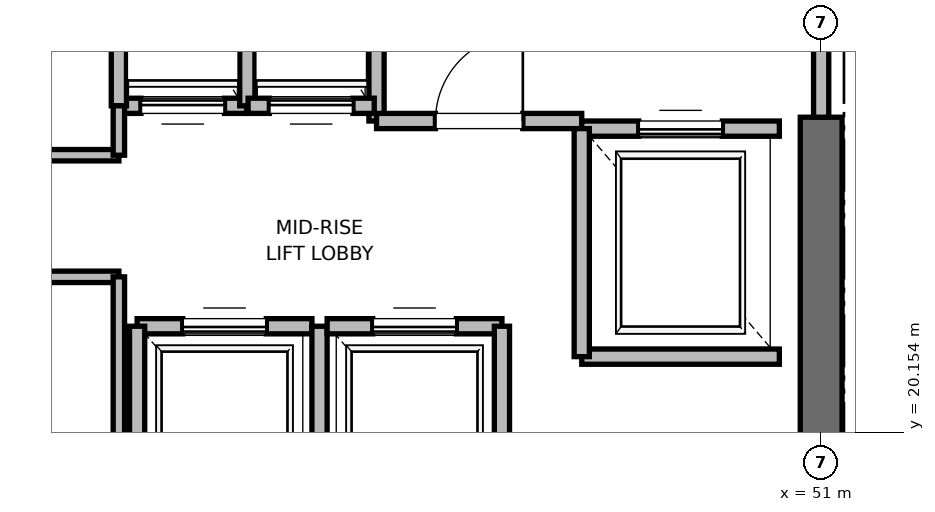
"""IFC4 building model, lengths in metres.
Left out: names, types, materials, properties, quantities, classifications, styles, units other than length and angle.
Written with IfcOpenShell. Run it as: python <this file> out.ifc"""

import sys

from ifc_helpers import new_model, si_unit, direction, frame, frame_2d, origin, place, context, subcontext, project, spatial, rectangle, extrude, element, fill, save


model = new_model("IFC4")
c1 = context("Model", 3, precision=1e-05, world=origin(), true_north=direction((0.0, 1.0)))
c2 = subcontext(c1, "Body", "Model", "MODEL_VIEW")
j1 = project(units=[si_unit("LENGTHUNIT", "METRE"), si_unit("PLANEANGLEUNIT", "RADIAN")], contexts=[c1])
p1 = place(None, origin())
s1 = spatial("IfcSite", under=j1, at=p1, CompositionType="ELEMENT")
p2 = place(p1, origin())
s2 = spatial("IfcBuilding", under=s1, at=p2, CompositionType="ELEMENT")
p3 = place(p2, frame((0.0, 0.0, 180.4)))
s3 = spatial("IfcBuildingStorey", under=s2, at=p3, CompositionType="ELEMENT", Elevation=180.4)
p4 = place(p3, frame((51.0, 18.5, 0.0), z_axis=(0.0, 0.0, 1.0), x_axis=(0.0, 1.0, 0.0)))
e1 = element("IfcWall", 1, at=p4, inside=s3, PredefinedType="SHEAR", context=c2, shape_type="SweptSolid", body=[
    extrude(rectangle(XDim=5.8, YDim=0.55, at=frame_2d((2.9, 0.0))), origin(), (0.0, 0.0, 1.0), 3.7),
])
p5 = place(p3, frame((45.15, 24.25, 0.0), z_axis=(0.0, 0.0, 1.0), x_axis=(0.0, 1.0, 0.0)))
e2 = element("IfcWall", 2, at=p5, inside=s3, PredefinedType="PARTITIONING", context=c2, shape_type="SweptSolid", body=[
    extrude(rectangle(XDim=3.37, YDim=0.2, at=frame_2d((1.685, 0.0))), origin(), (0.0, 0.0, 1.0), 3.7),
])
p6 = place(p3, frame((45.15, 24.25, 0.0), z_axis=(0.0, 0.0, 1.0), x_axis=(1.0, 0.0, 0.0)))
e3 = element("IfcWall", 3, at=p6, inside=s3, PredefinedType="PARTITIONING", context=c2, shape_type="SweptSolid", body=[
    extrude(rectangle(XDim=2.7, YDim=0.2, at=frame_2d((1.35, 0.0))), origin(), (0.0, 0.0, 1.0), 3.7),
])
p7 = place(p6, frame((0.775, 0.0, 0.0)))
e4 = element("IfcOpeningElement", 4, at=p7, cuts=e3, PredefinedType="OPENING", context=c2, shape_type="SweptSolid", body=[
    extrude(rectangle(XDim=1.15, YDim=2.2, at=frame_2d((0.575, 1.1))), frame((0.0, 0.1, 0.0), z_axis=(0.0, -1.0, 0.0), x_axis=(1.0, 0.0, 0.0)), (0.0, 0.0, 1.0), 0.2),
])
p8 = place(p3, frame((51.0, 24.3, 0.0), z_axis=(0.0, 0.0, 1.0), x_axis=(0.0, 1.0, 0.0)))
e5 = element("IfcWall", 5, at=p8, inside=s3, PredefinedType="PARTITIONING", context=c2, shape_type="SweptSolid", body=[
    extrude(rectangle(XDim=3.4, YDim=0.2, at=frame_2d((1.7, 0.0))), origin(), (0.0, 0.0, 1.0), 2.68),
])
p9 = place(p8, frame((1.125, 0.0, 0.0)))
e6 = element("IfcOpeningElement", 6, at=p9, cuts=e5, PredefinedType="OPENING", context=c2, shape_type="SweptSolid", body=[
    extrude(rectangle(XDim=1.15, YDim=2.2, at=frame_2d((0.575, 1.1))), frame((0.0, 0.1, 0.0), z_axis=(0.0, -1.0, 0.0), x_axis=(1.0, 0.0, 0.0)), (0.0, 0.0, 1.0), 0.2),
])
p10 = place(p3, frame((47.85, 21.15, 0.0), z_axis=(0.0, 0.0, 1.0), x_axis=(1.0, 0.0, 0.0)))
e7 = element("IfcWall", 7, at=p10, inside=s3, PredefinedType="SOLIDWALL", context=c2, shape_type="SweptSolid", body=[
    extrude(rectangle(XDim=2.6, YDim=0.2, at=frame_2d((1.3, 0.0))), origin(), (0.0, 0.0, 1.0), 3.7),
])
p11 = place(p3, frame((50.45, 24.15, 0.0), z_axis=(0.0, 0.0, 1.0), x_axis=(-1.0, 0.0, 0.0)))
e8 = element("IfcWall", 8, at=p11, inside=s3, PredefinedType="SOLIDWALL", context=c2, shape_type="SweptSolid", body=[
    extrude(rectangle(XDim=2.6, YDim=0.2, at=frame_2d((1.3, 0.0))), origin(), (0.0, 0.0, 1.0), 2.68),
])
p12 = place(p11, frame((0.75, 0.0, 0.0)))
e9 = element("IfcOpeningElement", 9, at=p12, cuts=e8, PredefinedType="OPENING", context=c2, shape_type="SweptSolid", body=[
    extrude(rectangle(XDim=1.1, YDim=2.2, at=frame_2d((0.55, 1.1))), frame((0.0, 0.1, 0.0), z_axis=(0.0, -1.0, 0.0), x_axis=(1.0, 0.0, 0.0)), (0.0, 0.0, 1.0), 0.2),
])
p13 = place(p3, frame((47.85, 24.15, 0.0), z_axis=(0.0, 0.0, 1.0), x_axis=(0.0, -1.0, 0.0)))
e10 = element("IfcWall", 10, at=p13, inside=s3, PredefinedType="SOLIDWALL", context=c2, shape_type="SweptSolid", body=[
    extrude(rectangle(XDim=3.0, YDim=0.2, at=frame_2d((1.5, 0.0))), origin(), (0.0, 0.0, 1.0), 3.7),
])
p14 = place(p3, frame((44.3, 21.55, 0.0), z_axis=(0.0, 0.0, 1.0), x_axis=(-1.0, 0.0, 0.0)))
e11 = element("IfcWall", 11, at=p14, inside=s3, PredefinedType="SOLIDWALL", context=c2, shape_type="SweptSolid", body=[
    extrude(rectangle(XDim=2.3, YDim=0.2, at=frame_2d((1.15, 0.0))), origin(), (0.0, 0.0, 1.0), 3.7),
])
p15 = place(p14, frame((0.6, 0.0, 0.0)))
e12 = element("IfcOpeningElement", 12, at=p15, cuts=e11, PredefinedType="OPENING", context=c2, shape_type="SweptSolid", body=[
    extrude(rectangle(XDim=1.1, YDim=2.2, at=frame_2d((0.55, 1.1))), frame((0.0, 0.1, 0.0), z_axis=(0.0, -1.0, 0.0), x_axis=(1.0, 0.0, 0.0)), (0.0, 0.0, 1.0), 0.2),
])
p16 = place(p3, frame((42.0, 21.55, 0.0), z_axis=(0.0, 0.0, 1.0), x_axis=(0.0, -1.0, 0.0)))
e13 = element("IfcWall", 13, at=p16, inside=s3, PredefinedType="SOLIDWALL", context=c2, shape_type="SweptSolid", body=[
    extrude(rectangle(XDim=2.6, YDim=0.2, at=frame_2d((1.3, 0.0))), origin(), (0.0, 0.0, 1.0), 2.68),
])
p17 = place(p3, frame((44.4, 18.95, 0.0), z_axis=(0.0, 0.0, 1.0), x_axis=(0.0, 1.0, 0.0)))
e14 = element("IfcWall", 14, at=p17, inside=s3, PredefinedType="SOLIDWALL", context=c2, shape_type="SweptSolid", body=[
    extrude(rectangle(XDim=2.6, YDim=0.2, at=frame_2d((1.3, 0.0))), origin(), (0.0, 0.0, 1.0), 3.7),
])
p18 = place(p3, frame((46.8, 21.55, 0.0), z_axis=(0.0, 0.0, 1.0), x_axis=(-1.0, 0.0, 0.0)))
e15 = element("IfcWall", 15, at=p18, inside=s3, PredefinedType="SOLIDWALL", context=c2, shape_type="SweptSolid", body=[
    extrude(rectangle(XDim=2.3, YDim=0.2, at=frame_2d((1.15, 0.0))), origin(), (0.0, 0.0, 1.0), 3.7),
])
p19 = place(p18, frame((0.6, 0.0, 0.0)))
e16 = element("IfcOpeningElement", 16, at=p19, cuts=e15, PredefinedType="OPENING", context=c2, shape_type="SweptSolid", body=[
    extrude(rectangle(XDim=1.1, YDim=2.2, at=frame_2d((0.55, 1.1))), frame((0.0, 0.1, 0.0), z_axis=(0.0, -1.0, 0.0), x_axis=(1.0, 0.0, 0.0)), (0.0, 0.0, 1.0), 0.2),
])
p20 = place(p3, frame((46.8, 18.95, 0.0), z_axis=(0.0, 0.0, 1.0), x_axis=(0.0, 1.0, 0.0)))
e17 = element("IfcWall", 17, at=p20, inside=s3, PredefinedType="SOLIDWALL", context=c2, shape_type="SweptSolid", body=[
    extrude(rectangle(XDim=2.6, YDim=0.2, at=frame_2d((1.3, 0.0))), origin(), (0.0, 0.0, 1.0), 3.7),
])
p21 = place(p3, frame((41.76, 24.45, 0.0), z_axis=(0.0, 0.0, 1.0), x_axis=(1.0, 0.0, 0.0)))
e18 = element("IfcWall", 18, at=p21, inside=s3, PredefinedType="SOLIDWALL", context=c2, shape_type="SweptSolid", body=[
    extrude(rectangle(XDim=1.68, YDim=0.2, at=frame_2d((0.84, 0.0))), origin(), (0.0, 0.0, 1.0), 3.7),
])
p22 = place(p21, frame((0.29, 0.0, 0.0)))
e19 = element("IfcOpeningElement", 19, at=p22, cuts=e18, PredefinedType="OPENING", context=c2, shape_type="SweptSolid", body=[
    extrude(rectangle(XDim=1.1, YDim=2.2, at=frame_2d((0.55, 1.1))), frame((0.0, 0.1, 0.0), z_axis=(0.0, -1.0, 0.0), x_axis=(1.0, 0.0, 0.0)), (0.0, 0.0, 1.0), 0.2),
])
for number, where, z_axis, x_axis in (
    (20, (41.76, 27.05, 0.0), (0.0, 0.0, 1.0), (0.0, -1.0, 0.0)),
    (21, (43.45, 24.45, 0.0), (0.0, 0.0, 1.0), (0.0, 1.0, 0.0)),
):
    element("IfcWall", number, at=place(p3, frame(where, z_axis=z_axis, x_axis=x_axis)), inside=s3, PredefinedType="SOLIDWALL", context=c2, shape_type="SweptSolid", body=[
        extrude(rectangle(XDim=2.6, YDim=0.2, at=frame_2d((1.3, 0.0))), origin(), (0.0, 0.0, 1.0), 3.7),
    ])
p23 = place(p3, frame((43.46, 24.45, 0.0), z_axis=(0.0, 0.0, 1.0), x_axis=(1.0, 0.0, 0.0)))
e22 = element("IfcWall", 22, at=p23, inside=s3, PredefinedType="SOLIDWALL", context=c2, shape_type="SweptSolid", body=[
    extrude(rectangle(XDim=1.66, YDim=0.2, at=frame_2d((0.83, 0.0))), origin(), (0.0, 0.0, 1.0), 3.7),
])
p24 = place(p23, frame((0.28, 0.0, 0.0)))
e23 = element("IfcOpeningElement", 23, at=p24, cuts=e22, PredefinedType="OPENING", context=c2, shape_type="SweptSolid", body=[
    extrude(rectangle(XDim=1.1, YDim=2.2, at=frame_2d((0.55, 1.1))), frame((0.0, 0.1, 0.0), z_axis=(0.0, -1.0, 0.0), x_axis=(1.0, 0.0, 0.0)), (0.0, 0.0, 1.0), 0.2),
])
for number, where, z_axis, x_axis in (
    (24, (39.95, 22.2, 0.0), (0.0, 0.0, 1.0), (1.0, 0.0, 0.0)),
    (25, (39.95, 23.8, 0.0), (0.0, 0.0, 1.0), (1.0, 0.0, 0.0)),
):
    element("IfcWall", number, at=place(p3, frame(where, z_axis=z_axis, x_axis=x_axis)), inside=s3, PredefinedType="PARTITIONING", context=c2, shape_type="SweptSolid", body=[
        extrude(rectangle(XDim=1.81, YDim=0.15, at=frame_2d((0.905, 0.0))), origin(), (0.0, 0.0, 1.0), 2.85),
    ])
p25 = place(p3, frame((41.76, 18.6, 0.0), z_axis=(0.0, 0.0, 1.0), x_axis=(0.0, 1.0, 0.0)))
e26 = element("IfcWall", 26, at=p25, inside=s3, PredefinedType="PARTITIONING", context=c2, shape_type="SweptSolid", body=[
    extrude(rectangle(XDim=3.6, YDim=0.15, at=frame_2d((1.8, 0.0))), origin(), (0.0, 0.0, 1.0), 2.68),
])
p26 = place(p3, frame((41.76, 23.8, 0.0), z_axis=(0.0, 0.0, 1.0), x_axis=(0.0, 1.0, 0.0)))
e27 = element("IfcWall", 27, at=p26, inside=s3, PredefinedType="PARTITIONING", context=c2, shape_type="SweptSolid", body=[
    extrude(rectangle(XDim=0.65, YDim=0.15, at=frame_2d((0.325, 0.0))), origin(), (0.0, 0.0, 1.0), 2.85),
])
p27 = place(p7, origin())
e28 = element("IfcDoor", 28, at=p27, inside=s3, OperationType="SINGLE_SWING_RIGHT", PredefinedType="DOOR", context=c2, shape_type="SweptSolid", body=[
    extrude(rectangle(XDim=1.15, YDim=2.2, at=frame_2d((0.575, 1.1))), frame((0.0, 0.025, 0.0), z_axis=(0.0, -1.0, 0.0), x_axis=(1.0, 0.0, 0.0)), (0.0, 0.0, 1.0), 0.05),
])
fill(e4, e28)
p28 = place(p12, origin())
e29 = element("IfcDoor", 29, at=p28, inside=s3, OperationType="SLIDING_TO_RIGHT", PredefinedType="DOOR", context=c2, shape_type="SweptSolid", body=[
    extrude(rectangle(XDim=1.1, YDim=2.2, at=frame_2d((0.55, 1.1))), frame((0.0, 0.025, 0.0), z_axis=(0.0, -1.0, 0.0), x_axis=(1.0, 0.0, 0.0)), (0.0, 0.0, 1.0), 0.05),
])
fill(e9, e29)
p29 = place(p15, origin())
e30 = element("IfcDoor", 30, at=p29, inside=s3, OperationType="SLIDING_TO_RIGHT", PredefinedType="DOOR", context=c2, shape_type="SweptSolid", body=[
    extrude(rectangle(XDim=1.1, YDim=2.2, at=frame_2d((0.55, 1.1))), frame((0.0, 0.025, 0.0), z_axis=(0.0, -1.0, 0.0), x_axis=(1.0, 0.0, 0.0)), (0.0, 0.0, 1.0), 0.05),
])
fill(e12, e30)
p30 = place(p19, origin())
e31 = element("IfcDoor", 31, at=p30, inside=s3, OperationType="SLIDING_TO_RIGHT", PredefinedType="DOOR", context=c2, shape_type="SweptSolid", body=[
    extrude(rectangle(XDim=1.1, YDim=2.2, at=frame_2d((0.55, 1.1))), frame((0.0, 0.025, 0.0), z_axis=(0.0, -1.0, 0.0), x_axis=(1.0, 0.0, 0.0)), (0.0, 0.0, 1.0), 0.05),
])
fill(e16, e31)
p31 = place(p22, origin())
e32 = element("IfcDoor", 32, at=p31, inside=s3, OperationType="SLIDING_TO_RIGHT", PredefinedType="DOOR", context=c2, shape_type="SweptSolid", body=[
    extrude(rectangle(XDim=1.1, YDim=2.2, at=frame_2d((0.55, 1.1))), frame((0.0, 0.025, 0.0), z_axis=(0.0, -1.0, 0.0), x_axis=(1.0, 0.0, 0.0)), (0.0, 0.0, 1.0), 0.05),
])
fill(e19, e32)
p32 = place(p24, origin())
e33 = element("IfcDoor", 33, at=p32, inside=s3, OperationType="SLIDING_TO_RIGHT", PredefinedType="DOOR", context=c2, shape_type="SweptSolid", body=[
    extrude(rectangle(XDim=1.1, YDim=2.2, at=frame_2d((0.55, 1.1))), frame((0.0, 0.025, 0.0), z_axis=(0.0, -1.0, 0.0), x_axis=(1.0, 0.0, 0.0)), (0.0, 0.0, 1.0), 0.05),
])
fill(e23, e33)
save(model, sys.argv[1])
